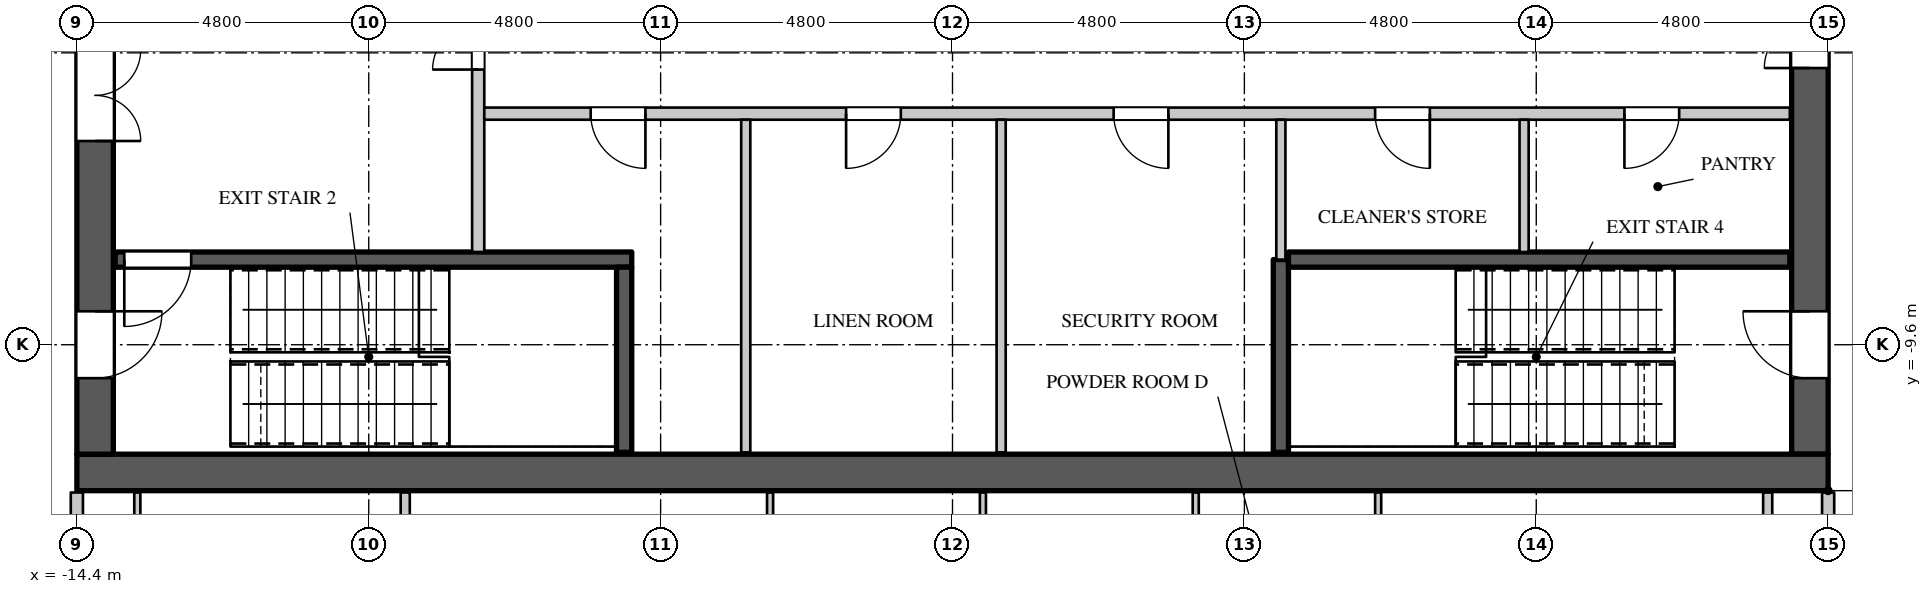
"""IFC4 building model, lengths in metres.
Left out: names, types, materials, properties, quantities, classifications, styles, units other than length and angle.
Written with IfcOpenShell. Run it as: python <this file> out.ifc"""

import sys

from ifc_helpers import new_model, si_unit, direction, frame, frame_2d, origin, place, context, subcontext, project, spatial, rectangle, extrude, element, fill, save


model = new_model("IFC4")
c1 = context("Model", 3, precision=1e-05, world=origin(), true_north=direction((0.0, 1.0)))
c2 = subcontext(c1, "Body", "Model", "MODEL_VIEW")
j1 = project(units=[si_unit("LENGTHUNIT", "METRE"), si_unit("PLANEANGLEUNIT", "RADIAN")], contexts=[c1])
p1 = place(None, origin())
s1 = spatial("IfcSite", under=j1, at=p1, CompositionType="ELEMENT")
p2 = place(p1, origin())
s2 = spatial("IfcBuilding", under=s1, at=p2, CompositionType="ELEMENT")
p3 = place(p2, frame((0.0, 0.0, 218.1)))
s3 = spatial("IfcBuildingStorey", under=s2, at=p3, CompositionType="ELEMENT", Elevation=218.1)
p4 = place(p3, frame((-14.4, -11.7, 0.0), z_axis=(0.0, 0.0, 1.0), x_axis=(1.0, 0.0, 0.0)))
e1 = element("IfcWall", 1, at=p4, inside=s3, PredefinedType="SHEAR", context=c2, shape_type="SweptSolid", body=[
    extrude(rectangle(XDim=28.8, YDim=0.6, at=frame_2d((14.4, 0.0))), origin(), (0.0, 0.0, 1.0), 4.2),
])
p5 = place(p3, frame((14.1, -11.4, 0.0), z_axis=(0.0, 0.0, 1.0), x_axis=(0.0, 1.0, 0.0)))
e2 = element("IfcWall", 2, at=p5, inside=s3, PredefinedType="SHEAR", context=c2, shape_type="SweptSolid", body=[
    extrude(rectangle(XDim=22.8, YDim=0.6, at=frame_2d((11.4, 0.0))), origin(), (0.0, 0.0, 1.0), 4.2),
])
p6 = place(p5, frame((20.45, 0.0, 0.0)))
e3 = element("IfcOpeningElement", 3, at=p6, cuts=e2, PredefinedType="OPENING", context=c2, shape_type="SweptSolid", body=[
    extrude(rectangle(XDim=1.1, YDim=2.2, at=frame_2d((0.55, 1.1))), frame((0.0, 0.31, 0.0), z_axis=(0.0, -1.0, 0.0), x_axis=(1.0, 0.0, 0.0)), (0.0, 0.0, 1.0), 0.62),
])
p7 = place(p5, frame((1.25, 0.0, 0.0)))
e4 = element("IfcOpeningElement", 4, at=p7, cuts=e2, PredefinedType="OPENING", context=c2, shape_type="SweptSolid", body=[
    extrude(rectangle(XDim=1.1, YDim=2.2, at=frame_2d((0.55, 1.1))), frame((0.0, 0.31, 0.0), z_axis=(0.0, -1.0, 0.0), x_axis=(1.0, 0.0, 0.0)), (0.0, 0.0, 1.0), 0.62),
])
p8 = place(p5, frame((14.95, 0.0, 0.0)))
e5 = element("IfcOpeningElement", 5, at=p8, cuts=e2, PredefinedType="OPENING", context=c2, shape_type="SweptSolid", body=[
    extrude(rectangle(XDim=1.5, YDim=2.4, at=frame_2d((0.75, 1.2))), frame((0.0, 0.31, 0.0), z_axis=(0.0, -1.0, 0.0), x_axis=(1.0, 0.0, 0.0)), (0.0, 0.0, 1.0), 0.62),
])
p9 = place(p5, frame((6.35, 0.0, 0.0)))
e6 = element("IfcOpeningElement", 6, at=p9, cuts=e2, PredefinedType="OPENING", context=c2, shape_type="SweptSolid", body=[
    extrude(rectangle(XDim=1.5, YDim=2.4, at=frame_2d((0.75, 1.2))), frame((0.0, 0.31, 0.0), z_axis=(0.0, -1.0, 0.0), x_axis=(1.0, 0.0, 0.0)), (0.0, 0.0, 1.0), 0.62),
])
p10 = place(p3, frame((-14.1, -11.4, 0.0), z_axis=(0.0, 0.0, 1.0), x_axis=(0.0, 1.0, 0.0)))
e7 = element("IfcWall", 7, at=p10, inside=s3, PredefinedType="SHEAR", context=c2, shape_type="SweptSolid", body=[
    extrude(rectangle(XDim=22.8, YDim=0.6, at=frame_2d((11.4, 0.0))), origin(), (0.0, 0.0, 1.0), 4.2),
])
p11 = place(p10, frame((20.45, 0.0, 0.0)))
e8 = element("IfcOpeningElement", 8, at=p11, cuts=e7, PredefinedType="OPENING", context=c2, shape_type="SweptSolid", body=[
    extrude(rectangle(XDim=1.1, YDim=2.2, at=frame_2d((0.55, 1.1))), frame((0.0, 0.31, 0.0), z_axis=(0.0, -1.0, 0.0), x_axis=(1.0, 0.0, 0.0)), (0.0, 0.0, 1.0), 0.62),
])
p12 = place(p10, frame((1.25, 0.0, 0.0)))
e9 = element("IfcOpeningElement", 9, at=p12, cuts=e7, PredefinedType="OPENING", context=c2, shape_type="SweptSolid", body=[
    extrude(rectangle(XDim=1.1, YDim=2.2, at=frame_2d((0.55, 1.1))), frame((0.0, 0.31, 0.0), z_axis=(0.0, -1.0, 0.0), x_axis=(1.0, 0.0, 0.0)), (0.0, 0.0, 1.0), 0.62),
])
p13 = place(p10, frame((16.15, 0.0, 0.0)))
e10 = element("IfcOpeningElement", 10, at=p13, cuts=e7, PredefinedType="OPENING", context=c2, shape_type="SweptSolid", body=[
    extrude(rectangle(XDim=1.5, YDim=2.4, at=frame_2d((0.75, 1.2))), frame((0.0, 0.31, 0.0), z_axis=(0.0, -1.0, 0.0), x_axis=(1.0, 0.0, 0.0)), (0.0, 0.0, 1.0), 0.62),
])
p14 = place(p10, frame((5.15, 0.0, 0.0)))
e11 = element("IfcOpeningElement", 11, at=p14, cuts=e7, PredefinedType="OPENING", context=c2, shape_type="SweptSolid", body=[
    extrude(rectangle(XDim=1.5, YDim=2.4, at=frame_2d((0.75, 1.2))), frame((0.0, 0.31, 0.0), z_axis=(0.0, -1.0, 0.0), x_axis=(1.0, 0.0, 0.0)), (0.0, 0.0, 1.0), 0.62),
])
p15 = place(p3, frame((-14.4, -14.3, 0.0), z_axis=(0.0, 0.0, 1.0), x_axis=(0.0, 1.0, 0.0)))
e12 = element("IfcWall", 12, at=p15, inside=s3, PredefinedType="PARTITIONING", context=c2, shape_type="SweptSolid", body=[
    extrude(rectangle(XDim=2.27, YDim=0.2, at=frame_2d((1.135, 0.0))), origin(), (0.0, 0.0, 1.0), 3.95),
])
p16 = place(p3, frame((-7.8, -8.075, 0.0), z_axis=(0.0, 0.0, 1.0), x_axis=(0.0, 1.0, 0.0)))
e13 = element("IfcWall", 13, at=p16, inside=s3, PredefinedType="PARTITIONING", context=c2, shape_type="SweptSolid", body=[
    extrude(rectangle(XDim=5.275, YDim=0.2, at=frame_2d((2.637, 0.0))), origin(), (0.0, 0.0, 1.0), 3.95),
])
p17 = place(p16, frame((3.0, 0.0, 0.0)))
e14 = element("IfcOpeningElement", 14, at=p17, cuts=e13, PredefinedType="OPENING", context=c2, shape_type="SweptSolid", body=[
    extrude(rectangle(XDim=1.5, YDim=2.4, at=frame_2d((0.75, 1.2))), frame((0.0, 0.11, 0.0), z_axis=(0.0, -1.0, 0.0), x_axis=(1.0, 0.0, 0.0)), (0.0, 0.0, 1.0), 0.22),
])
p18 = place(p3, frame((-7.7, -5.8, 0.0), z_axis=(0.0, 0.0, 1.0), x_axis=(1.0, 0.0, 0.0)))
e15 = element("IfcWall", 15, at=p18, inside=s3, PredefinedType="PARTITIONING", context=c2, shape_type="SweptSolid", body=[
    extrude(rectangle(XDim=21.47, YDim=0.2, at=frame_2d((10.735, 0.0))), origin(), (0.0, 0.0, 1.0), 3.95),
])
p19 = place(p18, frame((1.75, 0.0, 0.0)))
e16 = element("IfcOpeningElement", 16, at=p19, cuts=e15, PredefinedType="OPENING", context=c2, shape_type="SweptSolid", body=[
    extrude(rectangle(XDim=0.9, YDim=2.2, at=frame_2d((0.45, 1.1))), frame((0.0, 0.11, 0.0), z_axis=(0.0, -1.0, 0.0), x_axis=(1.0, 0.0, 0.0)), (0.0, 0.0, 1.0), 0.22),
])
p20 = place(p18, frame((5.95, 0.0, 0.0)))
e17 = element("IfcOpeningElement", 17, at=p20, cuts=e15, PredefinedType="OPENING", context=c2, shape_type="SweptSolid", body=[
    extrude(rectangle(XDim=0.9, YDim=2.2, at=frame_2d((0.45, 1.1))), frame((0.0, 0.11, 0.0), z_axis=(0.0, -1.0, 0.0), x_axis=(1.0, 0.0, 0.0)), (0.0, 0.0, 1.0), 0.22),
])
p21 = place(p18, frame((10.35, 0.0, 0.0)))
e18 = element("IfcOpeningElement", 18, at=p21, cuts=e15, PredefinedType="OPENING", context=c2, shape_type="SweptSolid", body=[
    extrude(rectangle(XDim=0.9, YDim=2.2, at=frame_2d((0.45, 1.1))), frame((0.0, 0.11, 0.0), z_axis=(0.0, -1.0, 0.0), x_axis=(1.0, 0.0, 0.0)), (0.0, 0.0, 1.0), 0.22),
])
p22 = place(p18, frame((14.65, 0.0, 0.0)))
e19 = element("IfcOpeningElement", 19, at=p22, cuts=e15, PredefinedType="OPENING", context=c2, shape_type="SweptSolid", body=[
    extrude(rectangle(XDim=0.9, YDim=2.2, at=frame_2d((0.45, 1.1))), frame((0.0, 0.11, 0.0), z_axis=(0.0, -1.0, 0.0), x_axis=(1.0, 0.0, 0.0)), (0.0, 0.0, 1.0), 0.22),
])
p23 = place(p18, frame((18.75, 0.0, 0.0)))
e20 = element("IfcOpeningElement", 20, at=p23, cuts=e15, PredefinedType="OPENING", context=c2, shape_type="SweptSolid", body=[
    extrude(rectangle(XDim=0.9, YDim=2.2, at=frame_2d((0.45, 1.1))), frame((0.0, 0.11, 0.0), z_axis=(0.0, -1.0, 0.0), x_axis=(1.0, 0.0, 0.0)), (0.0, 0.0, 1.0), 0.22),
])
p24 = place(p3, frame((14.4, -14.3, 0.0), z_axis=(0.0, 0.0, 1.0), x_axis=(0.0, 1.0, 0.0)))
e21 = element("IfcWall", 21, at=p24, inside=s3, PredefinedType="PARTITIONING", context=c2, shape_type="SweptSolid", body=[
    extrude(rectangle(XDim=2.27, YDim=0.2, at=frame_2d((1.135, 0.0))), origin(), (0.0, 0.0, 1.0), 3.95),
])
p25 = place(p3, frame((-9.0, -18.425, 0.0), z_axis=(0.0, 0.0, 1.0), x_axis=(0.0, 1.0, 0.0)))
e22 = element("IfcWall", 22, at=p25, inside=s3, PredefinedType="PARTITIONING", context=c2, shape_type="SweptSolid", body=[
    extrude(rectangle(XDim=6.395, YDim=0.15, at=frame_2d((3.198, 0.0))), origin(), (0.0, 0.0, 1.0), 3.95),
])
for number, where, z_axis, x_axis in (
    (23, (-3.4, -11.37, 0.0), (0.0, 0.0, 1.0), (0.0, 1.0, 0.0)),
    (24, (0.8, -11.37, 0.0), (0.0, 0.0, 1.0), (0.0, 1.0, 0.0)),
):
    element("IfcWall", number, at=place(p3, frame(where, z_axis=z_axis, x_axis=x_axis)), inside=s3, PredefinedType="PARTITIONING", context=c2, shape_type="SweptSolid", body=[
        extrude(rectangle(XDim=5.47, YDim=0.15, at=frame_2d((2.735, 0.0))), origin(), (0.0, 0.0, 1.0), 3.95),
    ])
p26 = place(p3, frame((5.4, -8.2, 0.0), z_axis=(0.0, 0.0, 1.0), x_axis=(0.0, 1.0, 0.0)))
e25 = element("IfcWall", 25, at=p26, inside=s3, PredefinedType="PARTITIONING", context=c2, shape_type="SweptSolid", body=[
    extrude(rectangle(XDim=2.3, YDim=0.15, at=frame_2d((1.15, 0.0))), origin(), (0.0, 0.0, 1.0), 3.95),
])
p27 = place(p3, frame((9.4, -8.075, 0.0), z_axis=(0.0, 0.0, 1.0), x_axis=(0.0, 1.0, 0.0)))
e26 = element("IfcWall", 26, at=p27, inside=s3, PredefinedType="PARTITIONING", context=c2, shape_type="SweptSolid", body=[
    extrude(rectangle(XDim=2.175, YDim=0.15, at=frame_2d((1.087, 0.0))), origin(), (0.0, 0.0, 1.0), 3.95),
])
p28 = place(p3, frame((13.406, -25.731, 0.0), z_axis=(0.0, 0.0, 1.0), x_axis=(0.0, 1.0, 0.0)))
e27 = element("IfcWall", 27, at=p28, inside=s3, PredefinedType="PARTITIONING", context=c2, shape_type="SweptSolid", body=[
    extrude(rectangle(XDim=13.701, YDim=0.15, at=frame_2d((6.851, 0.0))), origin(), (0.0, 0.0, 1.0), 3.3),
])
p29 = place(p28, frame((9.7, 0.0, 0.0)))
e28 = element("IfcOpeningElement", 28, at=p29, cuts=e27, PredefinedType="OPENING", context=c2, shape_type="SweptSolid", body=[
    extrude(rectangle(XDim=1.5, YDim=2.2, at=frame_2d((0.75, 1.1))), frame((0.0, 0.085, 0.0), z_axis=(0.0, -1.0, 0.0), x_axis=(1.0, 0.0, 0.0)), (0.0, 0.0, 1.0), 0.17),
])
p30 = place(p3, frame((-13.77, -8.2, 0.0), z_axis=(0.0, 0.0, 1.0), x_axis=(1.0, 0.0, 0.0)))
e29 = element("IfcWall", 29, at=p30, inside=s3, PredefinedType="SHEAR", context=c2, shape_type="SweptSolid", body=[
    extrude(rectangle(XDim=8.495, YDim=0.25, at=frame_2d((4.248, 0.0))), origin(), (0.0, 0.0, 1.0), 3.95),
])
p31 = place(p30, frame((0.15, 0.0, 0.0)))
e30 = element("IfcOpeningElement", 30, at=p31, cuts=e29, PredefinedType="OPENING", context=c2, shape_type="SweptSolid", body=[
    extrude(rectangle(XDim=1.1, YDim=2.2, at=frame_2d((0.55, 1.1))), frame((0.0, 0.135, 0.0), z_axis=(0.0, -1.0, 0.0), x_axis=(1.0, 0.0, 0.0)), (0.0, 0.0, 1.0), 0.27),
])
p32 = place(p3, frame((-5.4, -11.37, 0.0), z_axis=(0.0, 0.0, 1.0), x_axis=(0.0, 1.0, 0.0)))
e31 = element("IfcWall", 31, at=p32, inside=s3, PredefinedType="SHEAR", context=c2, shape_type="SweptSolid", body=[
    extrude(rectangle(XDim=3.045, YDim=0.25, at=frame_2d((1.522, 0.0))), origin(), (0.0, 0.0, 1.0), 3.95),
])
p33 = place(p3, frame((5.4, -11.37, 0.0), z_axis=(0.0, 0.0, 1.0), x_axis=(0.0, 1.0, 0.0)))
e32 = element("IfcWall", 32, at=p33, inside=s3, PredefinedType="SHEAR", context=c2, shape_type="SweptSolid", body=[
    extrude(rectangle(XDim=3.17, YDim=0.25, at=frame_2d((1.585, 0.0))), origin(), (0.0, 0.0, 1.0), 3.95),
])
p34 = place(p3, frame((5.525, -8.2, 0.0), z_axis=(0.0, 0.0, 1.0), x_axis=(1.0, 0.0, 0.0)))
e33 = element("IfcWall", 33, at=p34, inside=s3, PredefinedType="SHEAR", context=c2, shape_type="SweptSolid", body=[
    extrude(rectangle(XDim=8.245, YDim=0.25, at=frame_2d((4.123, 0.0))), origin(), (0.0, 0.0, 1.0), 3.95),
])
p35 = place(p3, frame((-13.406, -16.6, 0.0), z_axis=(0.0, 0.0, 1.0), x_axis=(0.0, 1.0, 0.0)))
e34 = element("IfcWall", 34, at=p35, inside=s3, PredefinedType="PARTITIONING", context=c2, shape_type="SweptSolid", body=[
    extrude(rectangle(XDim=4.57, YDim=0.1, at=frame_2d((2.285, 0.0))), origin(), (0.0, 0.0, 1.0), 3.3),
])
p36 = place(p3, frame((-3.0, -18.45, 0.0), z_axis=(0.0, 0.0, 1.0), x_axis=(0.0, 1.0, 0.0)))
e35 = element("IfcWall", 35, at=p36, inside=s3, PredefinedType="PARTITIONING", context=c2, shape_type="SweptSolid", body=[
    extrude(rectangle(XDim=6.42, YDim=0.1, at=frame_2d((3.21, 0.0))), origin(), (0.0, 0.0, 1.0), 3.95),
])
p37 = place(p36, frame((2.75, 0.0, 0.0)))
e36 = element("IfcOpeningElement", 36, at=p37, cuts=e35, PredefinedType="OPENING", context=c2, shape_type="SweptSolid", body=[
    extrude(rectangle(XDim=0.9, YDim=2.2, at=frame_2d((0.45, 1.1))), frame((0.0, 0.06, 0.0), z_axis=(0.0, -1.0, 0.0), x_axis=(1.0, 0.0, 0.0)), (0.0, 0.0, 1.0), 0.12),
])
p38 = place(p3, frame((0.5, -18.425, 0.0), z_axis=(0.0, 0.0, 1.0), x_axis=(0.0, 1.0, 0.0)))
e37 = element("IfcWall", 37, at=p38, inside=s3, PredefinedType="PARTITIONING", context=c2, shape_type="SweptSolid", body=[
    extrude(rectangle(XDim=6.395, YDim=0.1, at=frame_2d((3.198, 0.0))), origin(), (0.0, 0.0, 1.0), 3.95),
])
p39 = place(p38, frame((2.75, 0.0, 0.0)))
e38 = element("IfcOpeningElement", 38, at=p39, cuts=e37, PredefinedType="OPENING", context=c2, shape_type="SweptSolid", body=[
    extrude(rectangle(XDim=0.9, YDim=2.2, at=frame_2d((0.45, 1.1))), frame((0.0, 0.06, 0.0), z_axis=(0.0, -1.0, 0.0), x_axis=(1.0, 0.0, 0.0)), (0.0, 0.0, 1.0), 0.12),
])
p40 = place(p3, frame((4.0, -18.45, 0.0), z_axis=(0.0, 0.0, 1.0), x_axis=(0.0, 1.0, 0.0)))
e39 = element("IfcWall", 39, at=p40, inside=s3, PredefinedType="PARTITIONING", context=c2, shape_type="SweptSolid", body=[
    extrude(rectangle(XDim=6.42, YDim=0.1, at=frame_2d((3.21, 0.0))), origin(), (0.0, 0.0, 1.0), 3.95),
])
p41 = place(p3, frame((7.0, -17.475, 0.0), z_axis=(0.0, 0.0, 1.0), x_axis=(0.0, 1.0, 0.0)))
e40 = element("IfcWall", 40, at=p41, inside=s3, PredefinedType="PARTITIONING", context=c2, shape_type="SweptSolid", body=[
    extrude(rectangle(XDim=5.445, YDim=0.1, at=frame_2d((2.723, 0.0))), origin(), (0.0, 0.0, 1.0), 3.95),
])
p42 = place(p41, frame((2.25, 0.0, 0.0)))
e41 = element("IfcOpeningElement", 41, at=p42, cuts=e40, PredefinedType="OPENING", context=c2, shape_type="SweptSolid", body=[
    extrude(rectangle(XDim=0.9, YDim=2.2, at=frame_2d((0.45, 1.1))), frame((0.0, 0.06, 0.0), z_axis=(0.0, -1.0, 0.0), x_axis=(1.0, 0.0, 0.0)), (0.0, 0.0, 1.0), 0.12),
])
p43 = place(p19, origin())
e42 = element("IfcDoor", 42, at=p43, inside=s3, OperationType="SINGLE_SWING_LEFT", PredefinedType="DOOR", context=c2, shape_type="SweptSolid", body=[
    extrude(rectangle(XDim=0.9, YDim=2.2, at=frame_2d((0.45, 1.1))), frame((0.0, 0.025, 0.0), z_axis=(0.0, -1.0, 0.0), x_axis=(1.0, 0.0, 0.0)), (0.0, 0.0, 1.0), 0.05),
])
fill(e16, e42)
p44 = place(p20, origin())
e43 = element("IfcDoor", 43, at=p44, inside=s3, OperationType="SINGLE_SWING_RIGHT", PredefinedType="DOOR", context=c2, shape_type="SweptSolid", body=[
    extrude(rectangle(XDim=0.9, YDim=2.2, at=frame_2d((0.45, 1.1))), frame((0.0, 0.025, 0.0), z_axis=(0.0, -1.0, 0.0), x_axis=(1.0, 0.0, 0.0)), (0.0, 0.0, 1.0), 0.05),
])
fill(e17, e43)
p45 = place(p21, origin())
e44 = element("IfcDoor", 44, at=p45, inside=s3, OperationType="SINGLE_SWING_LEFT", PredefinedType="DOOR", context=c2, shape_type="SweptSolid", body=[
    extrude(rectangle(XDim=0.9, YDim=2.2, at=frame_2d((0.45, 1.1))), frame((0.0, 0.025, 0.0), z_axis=(0.0, -1.0, 0.0), x_axis=(1.0, 0.0, 0.0)), (0.0, 0.0, 1.0), 0.05),
])
fill(e18, e44)
p46 = place(p22, origin())
e45 = element("IfcDoor", 45, at=p46, inside=s3, OperationType="SINGLE_SWING_LEFT", PredefinedType="DOOR", context=c2, shape_type="SweptSolid", body=[
    extrude(rectangle(XDim=0.9, YDim=2.2, at=frame_2d((0.45, 1.1))), frame((0.0, 0.025, 0.0), z_axis=(0.0, -1.0, 0.0), x_axis=(1.0, 0.0, 0.0)), (0.0, 0.0, 1.0), 0.05),
])
fill(e19, e45)
p47 = place(p23, origin())
e46 = element("IfcDoor", 46, at=p47, inside=s3, OperationType="SINGLE_SWING_RIGHT", PredefinedType="DOOR", context=c2, shape_type="SweptSolid", body=[
    extrude(rectangle(XDim=0.9, YDim=2.2, at=frame_2d((0.45, 1.1))), frame((0.0, 0.025, 0.0), z_axis=(0.0, -1.0, 0.0), x_axis=(1.0, 0.0, 0.0)), (0.0, 0.0, 1.0), 0.05),
])
fill(e20, e46)
p48 = place(p31, origin())
e47 = element("IfcDoor", 47, at=p48, inside=s3, OperationType="SINGLE_SWING_RIGHT", PredefinedType="DOOR", context=c2, shape_type="SweptSolid", body=[
    extrude(rectangle(XDim=1.1, YDim=2.2, at=frame_2d((0.55, 1.1))), frame((0.0, 0.025, 0.0), z_axis=(0.0, -1.0, 0.0), x_axis=(1.0, 0.0, 0.0)), (0.0, 0.0, 1.0), 0.05),
])
fill(e30, e47)
p49 = place(p17, origin())
e48 = element("IfcDoor", 48, at=p49, inside=s3, OperationType="DOUBLE_DOOR_SINGLE_SWING", PredefinedType="DOOR", context=c2, shape_type="SweptSolid", body=[
    extrude(rectangle(XDim=1.5, YDim=2.4, at=frame_2d((0.75, 1.2))), frame((0.0, 0.025, 0.0), z_axis=(0.0, -1.0, 0.0), x_axis=(1.0, 0.0, 0.0)), (0.0, 0.0, 1.0), 0.05),
])
fill(e14, e48)
p50 = place(p12, origin())
e49 = element("IfcDoor", 49, at=p50, inside=s3, OperationType="SINGLE_SWING_LEFT", PredefinedType="DOOR", context=c2, shape_type="SweptSolid", body=[
    extrude(rectangle(XDim=1.1, YDim=2.2, at=frame_2d((0.55, 1.1))), frame((0.0, -0.245, 0.0), z_axis=(0.0, -1.0, 0.0), x_axis=(1.0, 0.0, 0.0)), (0.0, 0.0, 1.0), 0.05),
])
fill(e9, e49)
p51 = place(p7, origin())
e50 = element("IfcDoor", 50, at=p51, inside=s3, OperationType="SINGLE_SWING_RIGHT", PredefinedType="DOOR", context=c2, shape_type="SweptSolid", body=[
    extrude(rectangle(XDim=1.1, YDim=2.2, at=frame_2d((0.55, 1.1))), frame((0.0, 0.295, 0.0), z_axis=(0.0, -1.0, 0.0), x_axis=(1.0, 0.0, 0.0)), (0.0, 0.0, 1.0), 0.05),
])
fill(e4, e50)
p52 = place(p14, origin())
e51 = element("IfcDoor", 51, at=p52, inside=s3, OperationType="DOUBLE_DOOR_SINGLE_SWING", PredefinedType="DOOR", context=c2, shape_type="SweptSolid", body=[
    extrude(rectangle(XDim=1.5, YDim=2.4, at=frame_2d((0.75, 1.2))), frame((0.0, -0.245, 0.0), z_axis=(0.0, -1.0, 0.0), x_axis=(1.0, 0.0, 0.0)), (0.0, 0.0, 1.0), 0.05),
])
fill(e11, e51)
p53 = place(p9, origin())
e52 = element("IfcDoor", 52, at=p53, inside=s3, OperationType="DOUBLE_DOOR_SINGLE_SWING", PredefinedType="DOOR", context=c2, shape_type="SweptSolid", body=[
    extrude(rectangle(XDim=1.5, YDim=2.4, at=frame_2d((0.75, 1.2))), frame((0.0, 0.295, 0.0), z_axis=(0.0, -1.0, 0.0), x_axis=(1.0, 0.0, 0.0)), (0.0, 0.0, 1.0), 0.05),
])
fill(e6, e52)
save(model, sys.argv[1])
